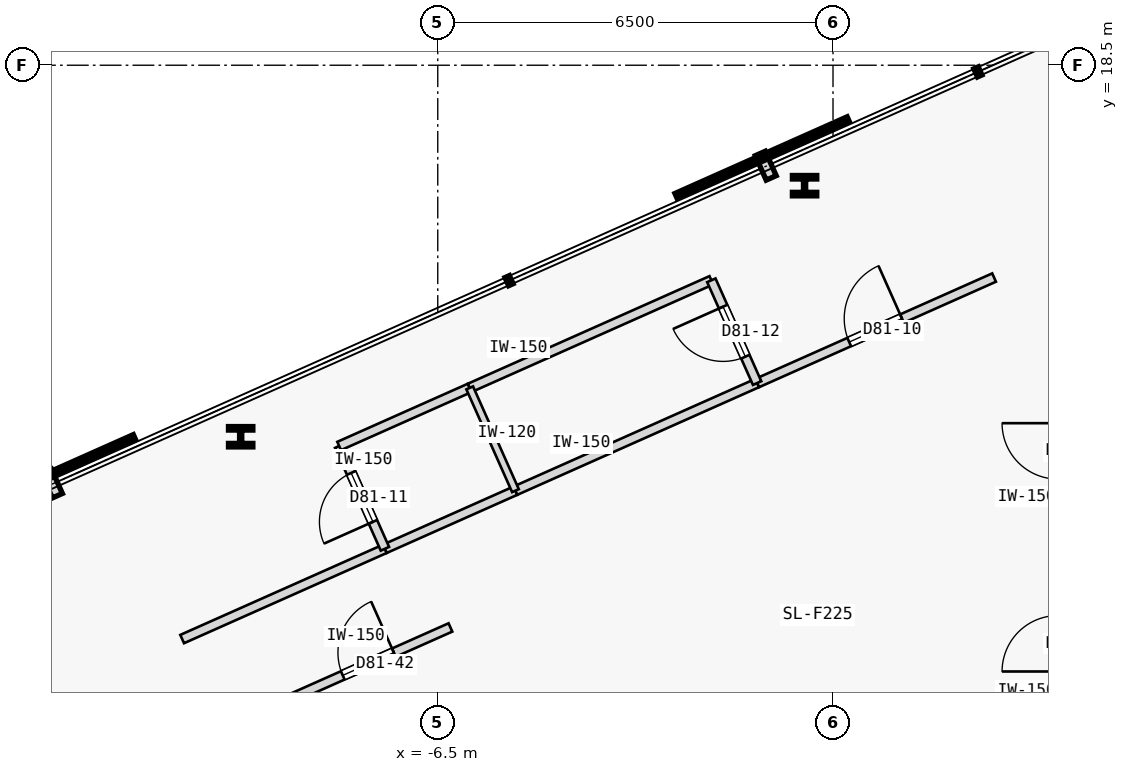
"""IFC4 building model, lengths in metres.
Left out: names, types, materials, properties, quantities, classifications, styles, units other than length and angle.
Written with IfcOpenShell. Run it as: python <this file> out.ifc"""

import sys

from ifc_helpers import new_model, si_unit, direction, frame, frame_2d, origin, origin_2d, place, context, subcontext, project, spatial, rectangle, i_section, extrude, element, fill, save


model = new_model("IFC4")
c1 = context("Model", 3, precision=1e-05, world=origin(), true_north=direction((0.0, 1.0)))
c2 = subcontext(c1, "Body", "Model", "MODEL_VIEW")
j1 = project(units=[si_unit("LENGTHUNIT", "METRE"), si_unit("PLANEANGLEUNIT", "RADIAN")], contexts=[c1])
p1 = place(None, origin())
s1 = spatial("IfcSite", under=j1, at=p1, CompositionType="ELEMENT")
p2 = place(p1, origin())
s2 = spatial("IfcBuilding", under=s1, at=p2, CompositionType="ELEMENT")
p3 = place(p2, frame((0.0, 0.0, 302.0)))
s3 = spatial("IfcBuildingStorey", under=s2, at=p3, CompositionType="ELEMENT", Elevation=302.0)
for number, where, z_axis, x_axis in (
    (1, (-0.468, 16.519, 0.0), (0.0, 0.0, 1.0), (1.0, 0.0, 0.0)),
    (2, (-9.741, 12.39, 0.0), (0.0, 0.0, 1.0), (1.0, 0.0, 0.0)),
):
    element("IfcColumn", number, at=place(p3, frame(where, z_axis=z_axis, x_axis=x_axis)), inside=s3, PredefinedType="COLUMN", context=c2, shape_type="SweptSolid", body=[
        extrude(i_section(OverallWidth=0.401, OverallDepth=0.335, WebThickness=0.036, FlangeThickness=0.058, FilletRadius=0.015, at=origin_2d()), origin(), (0.0, 0.0, 1.0), 3.55),
    ])
p4 = place(p3, frame((-10.703, 9.063, 0.0), z_axis=(0.0, 0.0, 1.0), x_axis=(0.913543802, 0.40674036169, 0.0)))
e3 = element("IfcWall", 3, at=p4, inside=s3, PredefinedType="PARTITIONING", context=c2, shape_type="SweptSolid", body=[
    extrude(rectangle(XDim=3.65, YDim=0.15, at=frame_2d((1.825, 0.0))), origin(), (0.0, 0.0, 1.0), 3.145),
])
p5 = place(p3, frame((-1.248, 13.273, 0.0), z_axis=(0.0, 0.0, 1.0), x_axis=(0.913549402293, 0.40672778313, 0.0)))
e4 = element("IfcWall", 4, at=p5, inside=s3, PredefinedType="PARTITIONING", context=c2, shape_type="SweptSolid", body=[
    extrude(rectangle(XDim=4.266, YDim=0.15, at=frame_2d((2.133, 0.0))), origin(), (0.0, 0.0, 1.0), 3.145),
])
p6 = place(p5, frame((1.658, 0.0, 0.0)))
e5 = element("IfcOpeningElement", 5, at=p6, cuts=e4, PredefinedType="OPENING", context=c2, shape_type="SweptSolid", body=[
    extrude(rectangle(XDim=0.95, YDim=2.04, at=frame_2d((0.475, 1.02))), frame((0.0, 0.085, 0.0), z_axis=(0.0, -1.0, 0.0), x_axis=(1.0, 0.0, 0.0)), (0.0, 0.0, 1.0), 0.17),
])
p7 = place(p3, frame((-7.369, 10.548, 0.0), z_axis=(0.0, 0.0, 1.0), x_axis=(0.913541436194, 0.406745675276, 0.0)))
e6 = element("IfcWall", 6, at=p7, inside=s3, PredefinedType="PARTITIONING", context=c2, shape_type="SweptSolid", body=[
    extrude(rectangle(XDim=2.35, YDim=0.15, at=frame_2d((1.175, 0.0))), origin(), (0.0, 0.0, 1.0), 3.145),
])
p8 = place(p3, frame((-5.222, 11.504, 0.0), z_axis=(0.0, 0.0, 1.0), x_axis=(0.913545193015, 0.406737237438, 0.0)))
e7 = element("IfcWall", 7, at=p8, inside=s3, PredefinedType="PARTITIONING", context=c2, shape_type="SweptSolid", body=[
    extrude(rectangle(XDim=4.35, YDim=0.15, at=frame_2d((2.175, 0.0))), origin(), (0.0, 0.0, 1.0), 3.145),
])
p9 = place(p3, frame((-8.992, 8.052, 0.0), z_axis=(0.0, 0.0, 1.0), x_axis=(0.913535467925, 0.406759079607, 0.0)))
e8 = element("IfcWall", 8, at=p9, inside=s3, PredefinedType="PARTITIONING", context=c2, shape_type="SweptSolid", body=[
    extrude(rectangle(XDim=2.956, YDim=0.15, at=frame_2d((1.478, 0.0))), origin(), (0.0, 0.0, 1.0), 3.145),
])
p10 = place(p9, frame((1.018, 0.0, 0.0)))
e9 = element("IfcOpeningElement", 9, at=p10, cuts=e8, PredefinedType="OPENING", context=c2, shape_type="SweptSolid", body=[
    extrude(rectangle(XDim=0.92, YDim=2.04, at=frame_2d((0.46, 1.02))), frame((0.0, 0.085, 0.0), z_axis=(0.0, -1.0, 0.0), x_axis=(1.0, 0.0, 0.0)), (0.0, 0.0, 1.0), 0.17),
])
p11 = place(p3, frame((-7.369, 10.548, 0.0), z_axis=(0.0, 0.0, 1.0), x_axis=(-0.406860767979, 0.913490183571, 0.0)))
e10 = element("IfcWall", 10, at=p11, inside=s3, PredefinedType="PARTITIONING", context=c2, shape_type="SweptSolid", body=[
    extrude(rectangle(XDim=1.85, YDim=0.15, at=frame_2d((0.925, 0.0))), origin(), (0.0, 0.0, 1.0), 3.145),
])
p12 = place(p11, frame((0.485, 0.0, 0.0)))
e11 = element("IfcOpeningElement", 11, at=p12, cuts=e10, PredefinedType="OPENING", context=c2, shape_type="SweptSolid", body=[
    extrude(rectangle(XDim=0.88, YDim=2.04, at=frame_2d((0.44, 1.02))), frame((0.0, 0.085, 0.0), z_axis=(0.0, -1.0, 0.0), x_axis=(1.0, 0.0, 0.0)), (0.0, 0.0, 1.0), 0.17),
])
p13 = place(p3, frame((-8.122, 12.238, 0.0), z_axis=(0.0, 0.0, 1.0), x_axis=(0.913558622212, 0.406707073682, 0.0)))
e12 = element("IfcWall", 12, at=p13, inside=s3, PredefinedType="PARTITIONING", context=c2, shape_type="SweptSolid", body=[
    extrude(rectangle(XDim=2.35, YDim=0.15, at=frame_2d((1.175, 0.0))), origin(), (0.0, 0.0, 1.0), 3.145),
])
p14 = place(p3, frame((-5.975, 13.194, 0.0), z_axis=(0.0, 0.0, 1.0), x_axis=(0.913545193015, 0.406737237438, 0.0)))
e13 = element("IfcWall", 13, at=p14, inside=s3, PredefinedType="PARTITIONING", context=c2, shape_type="SweptSolid", body=[
    extrude(rectangle(XDim=4.35, YDim=0.15, at=frame_2d((2.175, 0.0))), origin(), (0.0, 0.0, 1.0), 3.145),
])
p15 = place(p3, frame((-1.248, 13.273, 0.0), z_axis=(0.0, 0.0, 1.0), x_axis=(-0.406750635596, 0.913539227643, 0.0)))
e14 = element("IfcWall", 14, at=p15, inside=s3, PredefinedType="PARTITIONING", context=c2, shape_type="SweptSolid", body=[
    extrude(rectangle(XDim=1.85, YDim=0.15, at=frame_2d((0.925, 0.0))), origin(), (0.0, 0.0, 1.0), 3.145),
])
p16 = place(p15, frame((0.475, 0.0, 0.0)))
e15 = element("IfcOpeningElement", 15, at=p16, cuts=e14, PredefinedType="OPENING", context=c2, shape_type="SweptSolid", body=[
    extrude(rectangle(XDim=0.9, YDim=2.04, at=frame_2d((0.45, 1.02))), frame((0.0, 0.085, 0.0), z_axis=(0.0, -1.0, 0.0), x_axis=(1.0, 0.0, 0.0)), (0.0, 0.0, 1.0), 0.17),
])
p17 = place(p3, frame((-5.222, 11.504, 0.0), z_axis=(0.0, 0.0, 1.0), x_axis=(-0.406750635596, 0.913539227643, 0.0)))
e16 = element("IfcWall", 16, at=p17, inside=s3, PredefinedType="PARTITIONING", context=c2, shape_type="SweptSolid", body=[
    extrude(rectangle(XDim=1.85, YDim=0.12, at=frame_2d((0.925, 0.0))), origin(), (0.0, 0.0, 1.0), 3.145),
])
p18 = place(p6, origin())
e17 = element("IfcDoor", 17, at=p18, inside=s3, OperationType="SINGLE_SWING_RIGHT", PredefinedType="DOOR", context=c2, shape_type="SweptSolid", body=[
    extrude(rectangle(XDim=0.95, YDim=2.04, at=frame_2d((0.475, 1.02))), frame((0.0, 0.025, 0.0), z_axis=(0.0, -1.0, 0.0), x_axis=(1.0, 0.0, 0.0)), (0.0, 0.0, 1.0), 0.05),
])
fill(e5, e17)
p19 = place(p12, origin())
e18 = element("IfcDoor", 18, at=p19, inside=s3, OperationType="SINGLE_SWING_LEFT", PredefinedType="DOOR", context=c2, shape_type="SweptSolid", body=[
    extrude(rectangle(XDim=0.88, YDim=2.04, at=frame_2d((0.44, 1.02))), frame((0.0, 0.025, 0.0), z_axis=(0.0, -1.0, 0.0), x_axis=(1.0, 0.0, 0.0)), (0.0, 0.0, 1.0), 0.05),
])
fill(e11, e18)
p20 = place(p16, origin())
e19 = element("IfcDoor", 19, at=p20, inside=s3, OperationType="SINGLE_SWING_RIGHT", PredefinedType="DOOR", context=c2, shape_type="SweptSolid", body=[
    extrude(rectangle(XDim=0.9, YDim=2.04, at=frame_2d((0.45, 1.02))), frame((0.0, 0.025, 0.0), z_axis=(0.0, -1.0, 0.0), x_axis=(1.0, 0.0, 0.0)), (0.0, 0.0, 1.0), 0.05),
])
fill(e15, e19)
p21 = place(p10, origin())
e20 = element("IfcDoor", 20, at=p21, inside=s3, OperationType="SINGLE_SWING_RIGHT", PredefinedType="DOOR", context=c2, shape_type="SweptSolid", body=[
    extrude(rectangle(XDim=0.92, YDim=2.04, at=frame_2d((0.46, 1.02))), frame((0.0, 0.025, 0.0), z_axis=(0.0, -1.0, 0.0), x_axis=(1.0, 0.0, 0.0)), (0.0, 0.0, 1.0), 0.05),
])
fill(e9, e20)
save(model, sys.argv[1])
